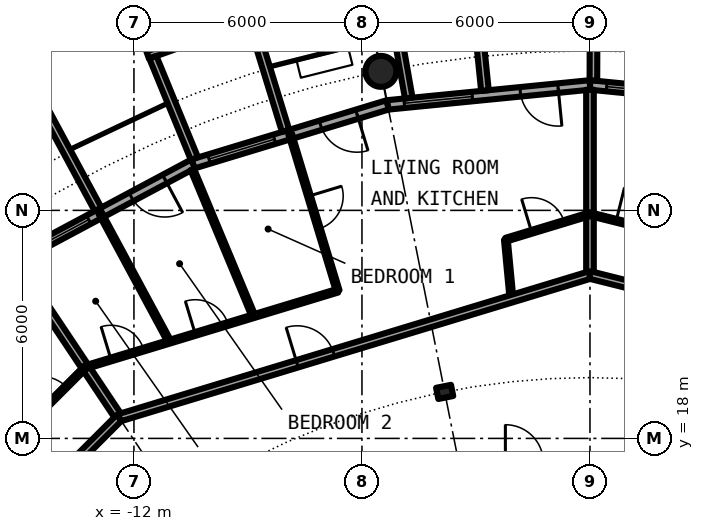
"""IFC4 building model, lengths in metres.
Left out: names, types, materials, properties, quantities, classifications, styles, units other than length and angle.
Written with IfcOpenShell. Run it as: python <this file> out.ifc"""

import sys

from ifc_helpers import new_model, si_unit, direction, frame, frame_2d, origin, origin_2d, place, context, subcontext, project, spatial, rectangle, circle, hollow_circle, i_section, extrude, element, fill, save


model = new_model("IFC4")
c1 = context("Model", 3, precision=1e-05, world=origin(), true_north=direction((0.0, 1.0)))
c2 = subcontext(c1, "Body", "Model", "MODEL_VIEW")
j1 = project(units=[si_unit("LENGTHUNIT", "METRE"), si_unit("PLANEANGLEUNIT", "RADIAN")], contexts=[c1])
p1 = place(None, origin())
s1 = spatial("IfcSite", under=j1, at=p1, CompositionType="ELEMENT")
p2 = place(p1, origin())
s2 = spatial("IfcBuilding", under=s1, at=p2, CompositionType="ELEMENT")
p3 = place(p2, frame((0.0, 0.0, 196.3)))
s3 = spatial("IfcBuildingStorey", under=s2, at=p3, CompositionType="ELEMENT", Elevation=196.3)
p4 = place(p3, frame((-5.501, 27.658, 0.0), z_axis=(0.0, 0.0, 1.0), x_axis=(1.0, 0.0, 0.0)))
e1 = element("IfcColumn", 1, at=p4, inside=s3, PredefinedType="COLUMN", context=c2, shape_type="SweptSolid", body=[
    extrude(hollow_circle(Radius=0.406, WallThickness=0.03, at=origin_2d()), origin(), (0.0, 0.0, 1.0), 3.05),
])
p5 = place(p3, frame((-3.824, 19.223, 0.0), z_axis=(0.0, 0.0, 1.0), x_axis=(-0.195090322016, 0.980785280403, 0.0)))
e2 = element("IfcColumn", 2, at=p5, inside=s3, PredefinedType="COLUMN", context=c2, shape_type="SweptSolid", body=[
    extrude(i_section(OverallWidth=0.3, OverallDepth=0.4, WebThickness=0.013, FlangeThickness=0.024, FilletRadius=0.027, at=origin_2d()), origin(), (0.0, 0.0, 1.0), 3.05),
])
p6 = place(p3, frame((5.326, 26.775, 0.0), z_axis=(0.0, 0.0, 1.0), x_axis=(-0.995173996315, 0.098126026407, 0.0)))
e3 = element("IfcWall", 3, at=p6, inside=s3, PredefinedType="SOLIDWALL", context=c2, shape_type="SweptSolid", body=[
    extrude(rectangle(XDim=5.352, YDim=0.25, at=frame_2d((2.676, 0.0))), origin(), (0.0, 0.0, 1.0), 2.7),
])
p7 = place(p6, frame((0.841, 0.0, 0.0)))
e4 = element("IfcOpeningElement", 4, at=p7, cuts=e3, PredefinedType="OPENING", context=c2, shape_type="SweptSolid", body=[
    extrude(rectangle(XDim=1.0, YDim=2.2, at=frame_2d((0.5, 1.1))), frame((0.0, 0.135, 0.0), z_axis=(0.0, -1.0, 0.0), x_axis=(1.0, 0.0, 0.0)), (0.0, 0.0, 1.0), 0.27),
])
p8 = place(p6, frame((3.111, 0.0, 0.3)))
e5 = element("IfcOpeningElement", 5, at=p8, cuts=e3, PredefinedType="OPENING", context=c2, shape_type="SweptSolid", body=[
    extrude(rectangle(XDim=1.8, YDim=2.1, at=frame_2d((0.9, 1.05))), frame((0.0, 0.135, 0.0), z_axis=(0.0, -1.0, 0.0), x_axis=(1.0, 0.0, 0.0)), (0.0, 0.0, 1.0), 0.27),
])
p9 = place(p3, frame((0.09, 27.417, -0.03), z_axis=(0.0, 0.0, 1.0), x_axis=(0.00347308367, 0.999993968827, 0.0)))
e6 = element("IfcWall", 6, at=p9, inside=s3, PredefinedType="SOLIDWALL", context=c2, shape_type="SweptSolid", body=[
    extrude(rectangle(XDim=2.882, YDim=0.2, at=frame_2d((1.441, 0.0))), origin(), (0.0, 0.0, 1.0), 2.73),
])
p10 = place(p3, frame((0.0, 27.3, 0.0), z_axis=(0.0, 0.0, 1.0), x_axis=(-0.995173996315, -0.098126026407, 0.0)))
e7 = element("IfcWall", 7, at=p10, inside=s3, PredefinedType="SOLIDWALL", context=c2, shape_type="SweptSolid", body=[
    extrude(rectangle(XDim=5.352, YDim=0.25, at=frame_2d((2.676, 0.0))), origin(), (0.0, 0.0, 1.0), 2.7),
])
p11 = place(p10, frame((0.841, 0.0, 0.0)))
e8 = element("IfcOpeningElement", 8, at=p11, cuts=e7, PredefinedType="OPENING", context=c2, shape_type="SweptSolid", body=[
    extrude(rectangle(XDim=1.0, YDim=2.2, at=frame_2d((0.5, 1.1))), frame((0.0, 0.135, 0.0), z_axis=(0.0, -1.0, 0.0), x_axis=(1.0, 0.0, 0.0)), (0.0, 0.0, 1.0), 0.27),
])
p12 = place(p10, frame((3.111, 0.0, 0.3)))
e9 = element("IfcOpeningElement", 9, at=p12, cuts=e7, PredefinedType="OPENING", context=c2, shape_type="SweptSolid", body=[
    extrude(rectangle(XDim=1.8, YDim=2.1, at=frame_2d((0.9, 1.05))), frame((0.0, 0.135, 0.0), z_axis=(0.0, -1.0, 0.0), x_axis=(1.0, 0.0, 0.0)), (0.0, 0.0, 1.0), 0.27),
])
p13 = place(p3, frame((-2.764, 27.153, -0.03), z_axis=(0.0, 0.0, 1.0), x_axis=(-0.101505487237, 0.994834979311, 0.0)))
e10 = element("IfcWall", 10, at=p13, inside=s3, PredefinedType="SOLIDWALL", context=c2, shape_type="SweptSolid", body=[
    extrude(rectangle(XDim=3.007, YDim=0.2, at=frame_2d((1.503, 0.0))), origin(), (0.0, 0.0, 1.0), 2.73),
])
p14 = place(p3, frame((-4.769, 26.956, -0.03), z_axis=(0.0, 0.0, 1.0), x_axis=(-0.174056778901, 0.984735618183, 0.0)))
e11 = element("IfcWall", 11, at=p14, inside=s3, PredefinedType="SOLIDWALL", context=c2, shape_type="SweptSolid", body=[
    extrude(rectangle(XDim=2.925, YDim=0.2, at=frame_2d((1.462, 0.0))), origin(), (0.0, 0.0, 1.0), 2.73),
])
p15 = place(p3, frame((-5.326, 26.775, 0.0), z_axis=(0.0, 0.0, 1.0), x_axis=(-0.956965678721, -0.290201119486, 0.0)))
e12 = element("IfcWall", 12, at=p15, inside=s3, PredefinedType="SOLIDWALL", context=c2, shape_type="SweptSolid", body=[
    extrude(rectangle(XDim=5.351, YDim=0.25, at=frame_2d((2.676, 0.0))), origin(), (0.0, 0.0, 1.0), 2.7),
])
p16 = place(p15, frame((0.841, 0.0, 0.0)))
e13 = element("IfcOpeningElement", 13, at=p16, cuts=e12, PredefinedType="OPENING", context=c2, shape_type="SweptSolid", body=[
    extrude(rectangle(XDim=1.0, YDim=2.2, at=frame_2d((0.5, 1.1))), frame((0.0, 0.135, 0.0), z_axis=(0.0, -1.0, 0.0), x_axis=(1.0, 0.0, 0.0)), (0.0, 0.0, 1.0), 0.27),
])
p17 = place(p15, frame((3.111, 0.0, 0.3)))
e14 = element("IfcOpeningElement", 14, at=p17, cuts=e12, PredefinedType="OPENING", context=c2, shape_type="SweptSolid", body=[
    extrude(rectangle(XDim=1.8, YDim=2.1, at=frame_2d((0.9, 1.05))), frame((0.0, 0.135, 0.0), z_axis=(0.0, -1.0, 0.0), x_axis=(1.0, 0.0, 0.0)), (0.0, 0.0, 1.0), 0.27),
])
p18 = place(p3, frame((-8.82, 29.093, -0.03), z_axis=(0.0, 0.0, 1.0), x_axis=(-0.941461077774, -0.337121697664, 0.0)))
e15 = element("IfcWall", 15, at=p18, inside=s3, PredefinedType="SOLIDWALL", context=c2, shape_type="SweptSolid", body=[
    extrude(rectangle(XDim=2.993, YDim=0.2, at=frame_2d((1.497, 0.0))), origin(), (0.0, 0.0, 1.0), 2.73),
])
p19 = place(p18, frame((0.457, 0.0, 0.33)))
e16 = element("IfcOpeningElement", 16, at=p19, cuts=e15, PredefinedType="OPENING", context=c2, shape_type="SweptSolid", body=[
    extrude(circle(Radius=1.04, at=frame_2d((1.04, 1.04))), frame((0.0, 0.11, 0.0), z_axis=(0.0, -1.0, 0.0), x_axis=(1.0, 0.0, 0.0)), (0.0, 0.0, 1.0), 0.22),
])
p20 = place(p3, frame((-8.009, 26.092, -0.03), z_axis=(0.0, 0.0, 1.0), x_axis=(-0.293406695073, 0.955987715029, 0.0)))
e17 = element("IfcWall", 17, at=p20, inside=s3, PredefinedType="SOLIDWALL", context=c2, shape_type="SweptSolid", body=[
    extrude(rectangle(XDim=3.006, YDim=0.2, at=frame_2d((1.503, 0.0))), origin(), (0.0, 0.0, 1.0), 2.73),
])
p21 = place(p3, frame((-10.409, 25.364, -0.03), z_axis=(0.0, 0.0, 1.0), x_axis=(-0.379509886562, 0.925187681501, 0.0)))
e18 = element("IfcWall", 18, at=p21, inside=s3, PredefinedType="SOLIDWALL", context=c2, shape_type="SweptSolid", body=[
    extrude(rectangle(XDim=2.883, YDim=0.2, at=frame_2d((1.441, 0.0))), origin(), (0.0, 0.0, 1.0), 2.73),
])
p22 = place(p3, frame((-10.447, 25.222, 0.0), z_axis=(0.0, 0.0, 1.0), x_axis=(-0.881915646801, -0.471407246368, 0.0)))
e19 = element("IfcWall", 19, at=p22, inside=s3, PredefinedType="SOLIDWALL", context=c2, shape_type="SweptSolid", body=[
    extrude(rectangle(XDim=5.352, YDim=0.25, at=frame_2d((2.676, 0.0))), origin(), (0.0, 0.0, 1.0), 2.7),
])
p23 = place(p22, frame((0.841, 0.0, 0.0)))
e20 = element("IfcOpeningElement", 20, at=p23, cuts=e19, PredefinedType="OPENING", context=c2, shape_type="SweptSolid", body=[
    extrude(rectangle(XDim=1.0, YDim=2.2, at=frame_2d((0.5, 1.1))), frame((0.0, 0.135, 0.0), z_axis=(0.0, -1.0, 0.0), x_axis=(1.0, 0.0, 0.0)), (0.0, 0.0, 1.0), 0.27),
])
p24 = place(p22, frame((3.111, 0.0, 0.3)))
e21 = element("IfcOpeningElement", 21, at=p24, cuts=e19, PredefinedType="OPENING", context=c2, shape_type="SweptSolid", body=[
    extrude(rectangle(XDim=1.8, YDim=2.1, at=frame_2d((0.9, 1.05))), frame((0.0, 0.135, 0.0), z_axis=(0.0, -1.0, 0.0), x_axis=(1.0, 0.0, 0.0)), (0.0, 0.0, 1.0), 0.27),
])
p25 = place(p3, frame((-12.945, 24.029, -0.03), z_axis=(0.0, 0.0, 1.0), x_axis=(-0.474424310775, 0.88029629861, 0.0)))
e22 = element("IfcWall", 22, at=p25, inside=s3, PredefinedType="SOLIDWALL", context=c2, shape_type="SweptSolid", body=[
    extrude(rectangle(XDim=3.006, YDim=0.2, at=frame_2d((1.503, 0.0))), origin(), (0.0, 0.0, 1.0), 2.73),
])
p26 = place(p3, frame((-15.097, 22.596, 0.0), z_axis=(0.0, 0.0, 1.0), x_axis=(0.555462686211, -0.831541462723, 0.0)))
e23 = element("IfcWall", 23, at=p26, inside=s3, PredefinedType="PARTITIONING", context=c2, shape_type="SweptSolid", body=[
    extrude(rectangle(XDim=4.875, YDim=0.2, at=frame_2d((2.438, 0.0))), origin(), (0.0, 0.0, 1.0), 2.7),
])
p27 = place(p3, frame((-12.887, 23.925, 0.0), z_axis=(0.0, 0.0, 1.0), x_axis=(0.474281720599, -0.88037313084, 0.0)))
e24 = element("IfcWall", 24, at=p27, inside=s3, PredefinedType="PARTITIONING", context=c2, shape_type="SweptSolid", body=[
    extrude(rectangle(XDim=3.842, YDim=0.1, at=frame_2d((1.921, 0.0))), origin(), (0.0, 0.0, 1.0), 2.7),
])
p28 = place(p3, frame((-10.465, 25.079, 0.0), z_axis=(0.0, 0.0, 1.0), x_axis=(0.385232176411, -0.922819684585, 0.0)))
e25 = element("IfcWall", 25, at=p28, inside=s3, PredefinedType="PARTITIONING", context=c2, shape_type="SweptSolid", body=[
    extrude(rectangle(XDim=4.187, YDim=0.1, at=frame_2d((2.094, 0.0))), origin(), (0.0, 0.0, 1.0), 2.7),
])
p29 = place(p3, frame((-7.888, 26.005, 0.0), z_axis=(0.0, 0.0, 1.0), x_axis=(0.290193157742, -0.956968093094, 0.0)))
e26 = element("IfcWall", 26, at=p29, inside=s3, PredefinedType="PARTITIONING", context=c2, shape_type="SweptSolid", body=[
    extrude(rectangle(XDim=4.304, YDim=0.1, at=frame_2d((2.152, 0.0))), origin(), (0.0, 0.0, 1.0), 2.7),
])
p30 = place(p29, frame((1.702, 0.0, 0.0)))
e27 = element("IfcOpeningElement", 27, at=p30, cuts=e26, PredefinedType="OPENING", context=c2, shape_type="SweptSolid", body=[
    extrude(rectangle(XDim=0.9, YDim=2.3, at=frame_2d((0.45, 1.15))), frame((0.0, 0.06, 0.0), z_axis=(0.0, -1.0, 0.0), x_axis=(1.0, 0.0, 0.0)), (0.0, 0.0, 1.0), 0.12),
])
p31 = place(p3, frame((-2.213, 23.229, 0.0), z_axis=(0.0, 0.0, 1.0), x_axis=(0.094720578196, -0.995503898569, 0.0)))
e28 = element("IfcWall", 28, at=p31, inside=s3, PredefinedType="PARTITIONING", context=c2, shape_type="SweptSolid", body=[
    extrude(rectangle(XDim=1.562, YDim=0.1, at=frame_2d((0.781, 0.0))), origin(), (0.0, 0.0, 1.0), 2.7),
])
p32 = place(p3, frame((0.0, 22.3, 0.0), z_axis=(0.0, 0.0, 1.0), x_axis=(0.0, 1.0, 0.0)))
e29 = element("IfcWall", 29, at=p32, inside=s3, PredefinedType="PARTITIONING", context=c2, shape_type="SweptSolid", body=[
    extrude(rectangle(XDim=4.875, YDim=0.2, at=frame_2d((2.438, 0.0))), origin(), (0.0, 0.0, 1.0), 2.7),
])
p33 = place(p3, frame((-12.389, 18.542, 0.0), z_axis=(0.0, 0.0, 1.0), x_axis=(0.956942051091, 0.290279022415, 0.0)))
e30 = element("IfcWall", 30, at=p33, inside=s3, PredefinedType="PARTITIONING", context=c2, shape_type="SweptSolid", body=[
    extrude(rectangle(XDim=12.946, YDim=0.2, at=frame_2d((6.473, 0.0))), origin(), (0.0, 0.0, 1.0), 2.7),
])
p34 = place(p33, frame((4.895, 0.0, 0.0)))
e31 = element("IfcOpeningElement", 31, at=p34, cuts=e30, PredefinedType="OPENING", context=c2, shape_type="SweptSolid", body=[
    extrude(rectangle(XDim=1.0, YDim=2.3, at=frame_2d((0.5, 1.15))), frame((0.0, 0.11, 0.0), z_axis=(0.0, -1.0, 0.0), x_axis=(1.0, 0.0, 0.0)), (0.0, 0.0, 1.0), 0.22),
])
p35 = place(p3, frame((0.0, 22.3, 0.0), z_axis=(0.0, 0.0, 1.0), x_axis=(0.969975381822, -0.243203122222, 0.0)))
e32 = element("IfcWall", 32, at=p35, inside=s3, PredefinedType="PARTITIONING", context=c2, shape_type="SweptSolid", body=[
    extrude(rectangle(XDim=10.843, YDim=0.2, at=frame_2d((5.421, 0.0))), origin(), (0.0, 0.0, 1.0), 2.7),
])
p36 = place(p35, frame((6.002, 0.0, 0.0)))
e33 = element("IfcOpeningElement", 33, at=p36, cuts=e32, PredefinedType="OPENING", context=c2, shape_type="SweptSolid", body=[
    extrude(rectangle(XDim=1.0, YDim=2.3, at=frame_2d((0.5, 1.15))), frame((0.0, 0.11, 0.0), z_axis=(0.0, -1.0, 0.0), x_axis=(1.0, 0.0, 0.0)), (0.0, 0.0, 1.0), 0.22),
])
p37 = place(p3, frame((-18.542, 12.389, 0.0), z_axis=(0.0, 0.0, 1.0), x_axis=(0.707106781187, 0.707106781187, 0.0)))
e34 = element("IfcWall", 34, at=p37, inside=s3, PredefinedType="PARTITIONING", context=c2, shape_type="SweptSolid", body=[
    extrude(rectangle(XDim=8.702, YDim=0.2, at=frame_2d((4.351, 0.0))), origin(), (0.0, 0.0, 1.0), 2.7),
])
p38 = place(p37, frame((4.938, 0.0, 0.0)))
e35 = element("IfcOpeningElement", 35, at=p38, cuts=e34, PredefinedType="OPENING", context=c2, shape_type="SweptSolid", body=[
    extrude(rectangle(XDim=1.0, YDim=2.3, at=frame_2d((0.5, 1.15))), frame((0.0, 0.11, 0.0), z_axis=(0.0, -1.0, 0.0), x_axis=(1.0, 0.0, 0.0)), (0.0, 0.0, 1.0), 0.22),
])
p39 = place(p3, frame((-13.281, 19.871, 0.0), z_axis=(0.0, 0.0, 1.0), x_axis=(0.956938868877, 0.290289512785, 0.0)))
e36 = element("IfcWall", 36, at=p39, inside=s3, PredefinedType="PARTITIONING", context=c2, shape_type="SweptSolid", body=[
    extrude(rectangle(XDim=6.941, YDim=0.1, at=frame_2d((3.47, 0.0))), origin(), (0.0, 0.0, 1.0), 2.7),
])
p40 = place(p39, frame((3.025, 0.0, 0.0)))
e37 = element("IfcOpeningElement", 37, at=p40, cuts=e36, PredefinedType="OPENING", context=c2, shape_type="SweptSolid", body=[
    extrude(rectangle(XDim=0.9, YDim=2.3, at=frame_2d((0.45, 1.15))), frame((0.0, 0.06, 0.0), z_axis=(0.0, -1.0, 0.0), x_axis=(1.0, 0.0, 0.0)), (0.0, 0.0, 1.0), 0.12),
])
p41 = place(p39, frame((0.708, 0.0, 0.0)))
e38 = element("IfcOpeningElement", 38, at=p41, cuts=e36, PredefinedType="OPENING", context=c2, shape_type="SweptSolid", body=[
    extrude(rectangle(XDim=0.9, YDim=2.3, at=frame_2d((0.45, 1.15))), frame((0.0, 0.06, 0.0), z_axis=(0.0, -1.0, 0.0), x_axis=(1.0, 0.0, 0.0)), (0.0, 0.0, 1.0), 0.12),
])
p42 = place(p3, frame((-2.216, 23.228, 0.0), z_axis=(0.0, 0.0, 1.0), x_axis=(0.956912517924, 0.290376364464, 0.0)))
e39 = element("IfcWall", 39, at=p42, inside=s3, PredefinedType="PARTITIONING", context=c2, shape_type="SweptSolid", body=[
    extrude(rectangle(XDim=2.314, YDim=0.1, at=frame_2d((1.157, 0.0))), origin(), (0.0, 0.0, 1.0), 2.7),
])
p43 = place(p42, frame((0.71, 0.0, 0.0)))
e40 = element("IfcOpeningElement", 40, at=p43, cuts=e39, PredefinedType="OPENING", context=c2, shape_type="SweptSolid", body=[
    extrude(rectangle(XDim=0.9, YDim=2.3, at=frame_2d((0.45, 1.15))), frame((0.0, 0.06, 0.0), z_axis=(0.0, -1.0, 0.0), x_axis=(1.0, 0.0, 0.0)), (0.0, 0.0, 1.0), 0.12),
])
p44 = place(p3, frame((0.003, 23.899, 0.0), z_axis=(0.0, 0.0, 1.0), x_axis=(0.970074448647, -0.242807668911, 0.0)))
e41 = element("IfcWall", 41, at=p44, inside=s3, PredefinedType="PARTITIONING", context=c2, shape_type="SweptSolid", body=[
    extrude(rectangle(XDim=2.323, YDim=0.1, at=frame_2d((1.161, 0.0))), origin(), (0.0, 0.0, 1.0), 2.7),
])
p45 = place(p44, frame((0.708, 0.0, 0.0)))
e42 = element("IfcOpeningElement", 42, at=p45, cuts=e41, PredefinedType="OPENING", context=c2, shape_type="SweptSolid", body=[
    extrude(rectangle(XDim=0.9, YDim=2.3, at=frame_2d((0.45, 1.15))), frame((0.0, 0.06, 0.0), z_axis=(0.0, -1.0, 0.0), x_axis=(1.0, 0.0, 0.0)), (0.0, 0.0, 1.0), 0.12),
])
p46 = place(p3, frame((-16.575, 16.575, 0.0), z_axis=(0.0, 0.0, 1.0), x_axis=(0.707080600289, 0.707132961115, 0.0)))
e43 = element("IfcWall", 43, at=p46, inside=s3, PredefinedType="PARTITIONING", context=c2, shape_type="SweptSolid", body=[
    extrude(rectangle(XDim=4.663, YDim=0.1, at=frame_2d((2.331, 0.0))), origin(), (0.0, 0.0, 1.0), 2.7),
])
p47 = place(p46, frame((3.043, 0.0, 0.0)))
e44 = element("IfcOpeningElement", 44, at=p47, cuts=e43, PredefinedType="OPENING", context=c2, shape_type="SweptSolid", body=[
    extrude(rectangle(XDim=0.9, YDim=2.3, at=frame_2d((0.45, 1.15))), frame((0.0, 0.06, 0.0), z_axis=(0.0, -1.0, 0.0), x_axis=(1.0, 0.0, 0.0)), (0.0, 0.0, 1.0), 0.12),
])
p48 = place(p8, origin())
e45 = element("IfcWindow", 45, at=p48, inside=s3, PartitioningType="SINGLE_PANEL", PredefinedType="WINDOW", context=c2, shape_type="SweptSolid", body=[
    extrude(rectangle(XDim=1.8, YDim=2.1, at=frame_2d((0.9, 1.05))), frame((0.0, 0.03, 0.0), z_axis=(0.0, -1.0, 0.0), x_axis=(1.0, 0.0, 0.0)), (0.0, 0.0, 1.0), 0.06),
])
fill(e5, e45)
p49 = place(p11, origin())
e46 = element("IfcDoor", 46, at=p49, inside=s3, OperationType="SINGLE_SWING_LEFT", PredefinedType="DOOR", context=c2, shape_type="SweptSolid", body=[
    extrude(rectangle(XDim=1.0, YDim=2.2, at=frame_2d((0.5, 1.1))), frame((0.0, 0.025, 0.0), z_axis=(0.0, -1.0, 0.0), x_axis=(1.0, 0.0, 0.0)), (0.0, 0.0, 1.0), 0.05),
])
fill(e8, e46)
p50 = place(p12, origin())
e47 = element("IfcWindow", 47, at=p50, inside=s3, PartitioningType="SINGLE_PANEL", PredefinedType="WINDOW", context=c2, shape_type="SweptSolid", body=[
    extrude(rectangle(XDim=1.8, YDim=2.1, at=frame_2d((0.9, 1.05))), frame((0.0, 0.03, 0.0), z_axis=(0.0, -1.0, 0.0), x_axis=(1.0, 0.0, 0.0)), (0.0, 0.0, 1.0), 0.06),
])
fill(e9, e47)
p51 = place(p16, origin())
e48 = element("IfcDoor", 48, at=p51, inside=s3, OperationType="SINGLE_SWING_LEFT", PredefinedType="DOOR", context=c2, shape_type="SweptSolid", body=[
    extrude(rectangle(XDim=1.0, YDim=2.2, at=frame_2d((0.5, 1.1))), frame((0.0, 0.025, 0.0), z_axis=(0.0, -1.0, 0.0), x_axis=(1.0, 0.0, 0.0)), (0.0, 0.0, 1.0), 0.05),
])
fill(e13, e48)
p52 = place(p17, origin())
e49 = element("IfcWindow", 49, at=p52, inside=s3, PartitioningType="SINGLE_PANEL", PredefinedType="WINDOW", context=c2, shape_type="SweptSolid", body=[
    extrude(rectangle(XDim=1.8, YDim=2.1, at=frame_2d((0.9, 1.05))), frame((0.0, 0.03, 0.0), z_axis=(0.0, -1.0, 0.0), x_axis=(1.0, 0.0, 0.0)), (0.0, 0.0, 1.0), 0.06),
])
fill(e14, e49)
p53 = place(p23, origin())
e50 = element("IfcDoor", 50, at=p53, inside=s3, OperationType="SINGLE_SWING_LEFT", PredefinedType="DOOR", context=c2, shape_type="SweptSolid", body=[
    extrude(rectangle(XDim=1.0, YDim=2.2, at=frame_2d((0.5, 1.1))), frame((0.0, 0.025, 0.0), z_axis=(0.0, -1.0, 0.0), x_axis=(1.0, 0.0, 0.0)), (0.0, 0.0, 1.0), 0.05),
])
fill(e20, e50)
p54 = place(p24, origin())
e51 = element("IfcWindow", 51, at=p54, inside=s3, PartitioningType="SINGLE_PANEL", PredefinedType="WINDOW", context=c2, shape_type="SweptSolid", body=[
    extrude(rectangle(XDim=1.8, YDim=2.1, at=frame_2d((0.9, 1.05))), frame((0.0, 0.03, 0.0), z_axis=(0.0, -1.0, 0.0), x_axis=(1.0, 0.0, 0.0)), (0.0, 0.0, 1.0), 0.06),
])
fill(e21, e51)
p55 = place(p45, origin())
e52 = element("IfcDoor", 52, at=p55, inside=s3, OperationType="SINGLE_SWING_LEFT", PredefinedType="DOOR", context=c2, shape_type="SweptSolid", body=[
    extrude(rectangle(XDim=0.9, YDim=2.3, at=frame_2d((0.45, 1.15))), frame((0.0, 0.025, 0.0), z_axis=(0.0, -1.0, 0.0), x_axis=(1.0, 0.0, 0.0)), (0.0, 0.0, 1.0), 0.05),
])
fill(e42, e52)
p56 = place(p34, origin())
e53 = element("IfcDoor", 53, at=p56, inside=s3, OperationType="SINGLE_SWING_LEFT", PredefinedType="DOOR", context=c2, shape_type="SweptSolid", body=[
    extrude(rectangle(XDim=1.0, YDim=2.3, at=frame_2d((0.5, 1.15))), frame((0.0, 0.025, 0.0), z_axis=(0.0, -1.0, 0.0), x_axis=(1.0, 0.0, 0.0)), (0.0, 0.0, 1.0), 0.05),
])
fill(e31, e53)
p57 = place(p43, origin())
e54 = element("IfcDoor", 54, at=p57, inside=s3, OperationType="SINGLE_SWING_RIGHT", PredefinedType="DOOR", context=c2, shape_type="SweptSolid", body=[
    extrude(rectangle(XDim=0.9, YDim=2.3, at=frame_2d((0.45, 1.15))), frame((0.0, 0.025, 0.0), z_axis=(0.0, -1.0, 0.0), x_axis=(1.0, 0.0, 0.0)), (0.0, 0.0, 1.0), 0.05),
])
fill(e40, e54)
p58 = place(p30, origin())
e55 = element("IfcDoor", 55, at=p58, inside=s3, OperationType="SINGLE_SWING_LEFT", PredefinedType="DOOR", context=c2, shape_type="SweptSolid", body=[
    extrude(rectangle(XDim=0.9, YDim=2.3, at=frame_2d((0.45, 1.15))), frame((0.0, 0.025, 0.0), z_axis=(0.0, -1.0, 0.0), x_axis=(1.0, 0.0, 0.0)), (0.0, 0.0, 1.0), 0.05),
])
fill(e27, e55)
p59 = place(p40, origin())
e56 = element("IfcDoor", 56, at=p59, inside=s3, OperationType="SINGLE_SWING_RIGHT", PredefinedType="DOOR", context=c2, shape_type="SweptSolid", body=[
    extrude(rectangle(XDim=0.9, YDim=2.3, at=frame_2d((0.45, 1.15))), frame((0.0, 0.025, 0.0), z_axis=(0.0, -1.0, 0.0), x_axis=(1.0, 0.0, 0.0)), (0.0, 0.0, 1.0), 0.05),
])
fill(e37, e56)
p60 = place(p41, origin())
e57 = element("IfcDoor", 57, at=p60, inside=s3, OperationType="SINGLE_SWING_LEFT", PredefinedType="DOOR", context=c2, shape_type="SweptSolid", body=[
    extrude(rectangle(XDim=0.9, YDim=2.3, at=frame_2d((0.45, 1.15))), frame((0.0, 0.025, 0.0), z_axis=(0.0, -1.0, 0.0), x_axis=(1.0, 0.0, 0.0)), (0.0, 0.0, 1.0), 0.05),
])
fill(e38, e57)
p61 = place(p47, origin())
e58 = element("IfcDoor", 58, at=p61, inside=s3, OperationType="SINGLE_SWING_RIGHT", PredefinedType="DOOR", context=c2, shape_type="SweptSolid", body=[
    extrude(rectangle(XDim=0.9, YDim=2.3, at=frame_2d((0.45, 1.15))), frame((0.0, 0.025, 0.0), z_axis=(0.0, -1.0, 0.0), x_axis=(1.0, 0.0, 0.0)), (0.0, 0.0, 1.0), 0.05),
])
fill(e44, e58)
save(model, sys.argv[1])
